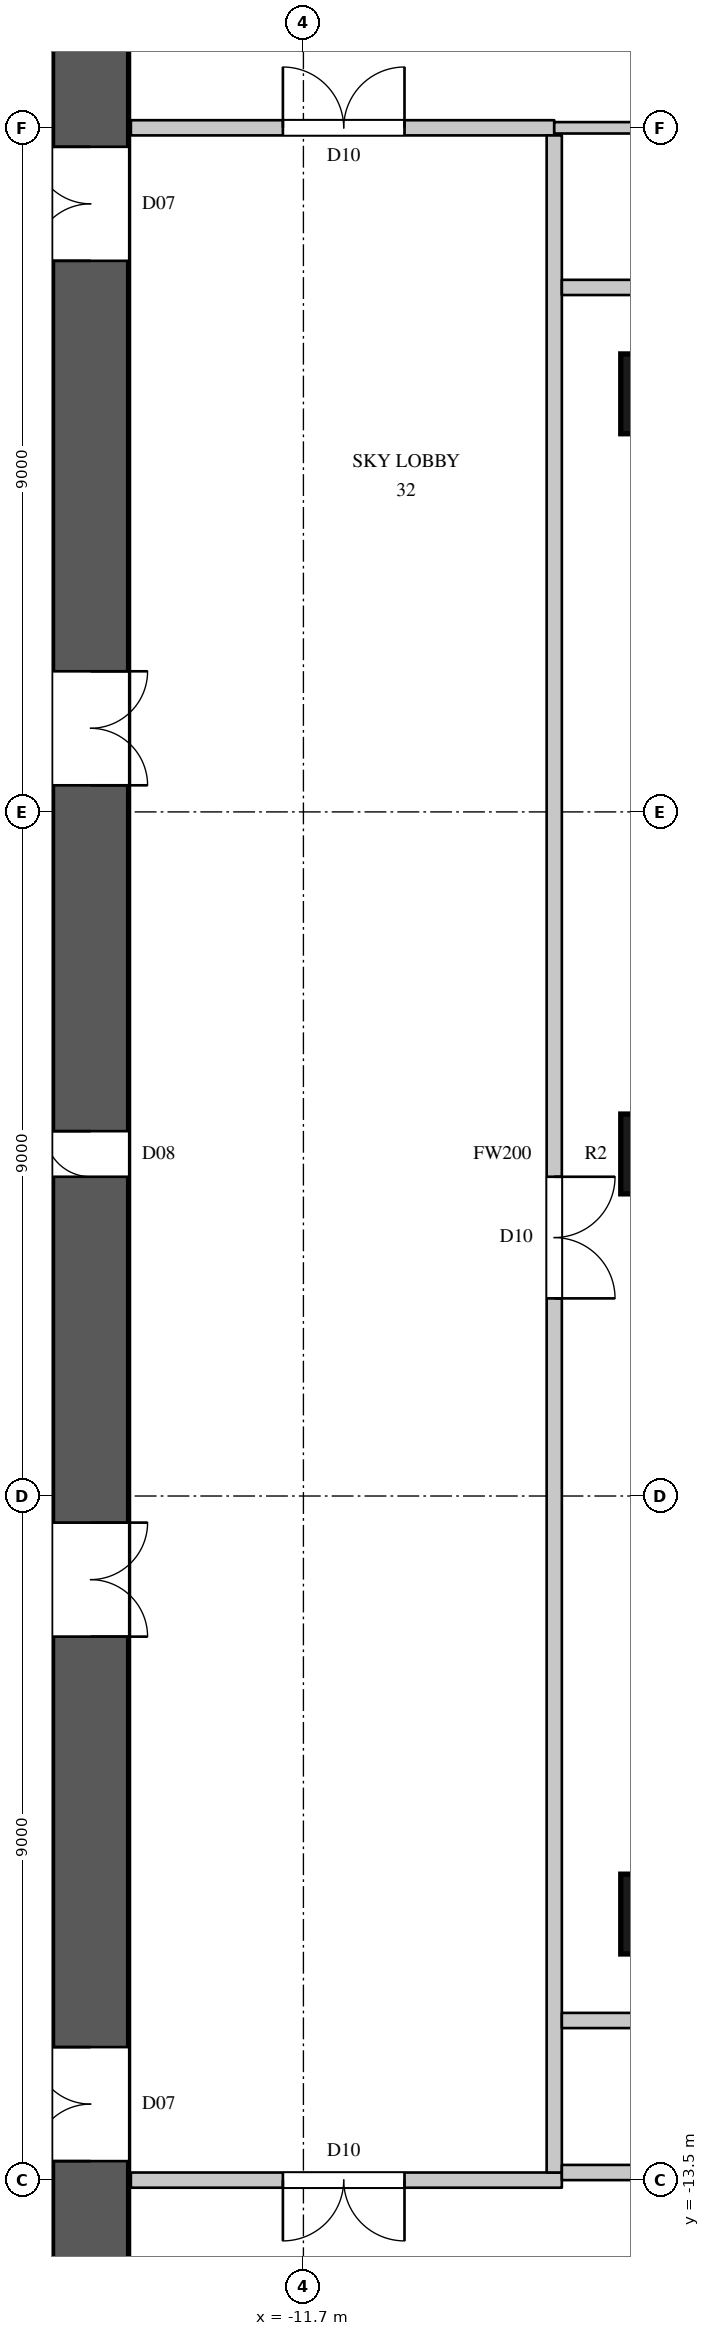
"""IFC4 building model, lengths in metres.
Left out: names, types, materials, properties, quantities, classifications, styles, units other than length and angle.
Written with IfcOpenShell. Run it as: python <this file> out.ifc"""

import sys

from ifc_helpers import new_model, si_unit, direction, frame, frame_2d, origin, origin_2d, place, context, subcontext, project, spatial, rectangle, circle, extrude, element, fill, save


model = new_model("IFC4")
c1 = context("Model", 3, precision=1e-05, world=origin(), true_north=direction((0.0, 1.0)))
c2 = subcontext(c1, "Body", "Model", "MODEL_VIEW")
j1 = project(units=[si_unit("LENGTHUNIT", "METRE"), si_unit("PLANEANGLEUNIT", "RADIAN")], contexts=[c1])
p1 = place(None, origin())
s1 = spatial("IfcSite", under=j1, at=p1, CompositionType="ELEMENT")
p2 = place(p1, origin())
s2 = spatial("IfcBuilding", under=s1, at=p2, CompositionType="ELEMENT")
p3 = place(p2, frame((0.0, 0.0, 145.5)))
s3 = spatial("IfcBuildingStorey", under=s2, at=p3, CompositionType="ELEMENT", Elevation=145.5)
for number, where, z_axis, x_axis in (
    (1, (-7.0, -10.0, 0.0), (0.0, 0.0, 1.0), (1.0, 0.0, 0.0)),
    (2, (-7.0, 0.0, 0.0), (0.0, 0.0, 1.0), (1.0, 0.0, 0.0)),
    (3, (-7.0, 10.0, 0.0), (0.0, 0.0, 1.0), (1.0, 0.0, 0.0)),
):
    element("IfcColumn", number, at=place(p3, frame(where, z_axis=z_axis, x_axis=x_axis)), inside=s3, PredefinedType="COLUMN", context=c2, shape_type="SweptSolid", body=[
        extrude(circle(Radius=0.525, at=origin_2d()), origin(), (0.0, 0.0, 1.0), 7.0),
    ])
p4 = place(p3, frame((-14.5, -14.8, 0.0), z_axis=(0.0, 0.0, 1.0), x_axis=(0.0, 1.0, 0.0)))
e4 = element("IfcWall", 4, at=p4, inside=s3, PredefinedType="SHEAR", context=c2, shape_type="SweptSolid", body=[
    extrude(rectangle(XDim=29.6, YDim=1.0, at=frame_2d((14.8, 0.0))), origin(), (0.0, 0.0, 1.0), 7.0),
])
p5 = place(p4, frame((1.55, 0.0, 0.0)))
e5 = element("IfcOpeningElement", 5, at=p5, cuts=e4, PredefinedType="OPENING", context=c2, shape_type="SweptSolid", body=[
    extrude(rectangle(XDim=1.5, YDim=2.4, at=frame_2d((0.75, 1.2))), frame((0.0, 0.51, 0.0), z_axis=(0.0, -1.0, 0.0), x_axis=(1.0, 0.0, 0.0)), (0.0, 0.0, 1.0), 1.02),
])
p6 = place(p4, frame((26.55, 0.0, 0.0)))
e6 = element("IfcOpeningElement", 6, at=p6, cuts=e4, PredefinedType="OPENING", context=c2, shape_type="SweptSolid", body=[
    extrude(rectangle(XDim=1.5, YDim=2.4, at=frame_2d((0.75, 1.2))), frame((0.0, 0.51, 0.0), z_axis=(0.0, -1.0, 0.0), x_axis=(1.0, 0.0, 0.0)), (0.0, 0.0, 1.0), 1.02),
])
p7 = place(p4, frame((8.45, 0.0, 0.0)))
e7 = element("IfcOpeningElement", 7, at=p7, cuts=e4, PredefinedType="OPENING", context=c2, shape_type="SweptSolid", body=[
    extrude(rectangle(XDim=1.5, YDim=2.4, at=frame_2d((0.75, 1.2))), frame((0.0, 0.51, 0.0), z_axis=(0.0, -1.0, 0.0), x_axis=(1.0, 0.0, 0.0)), (0.0, 0.0, 1.0), 1.02),
])
p8 = place(p4, frame((19.65, 0.0, 0.0)))
e8 = element("IfcOpeningElement", 8, at=p8, cuts=e4, PredefinedType="OPENING", context=c2, shape_type="SweptSolid", body=[
    extrude(rectangle(XDim=1.5, YDim=2.4, at=frame_2d((0.75, 1.2))), frame((0.0, 0.51, 0.0), z_axis=(0.0, -1.0, 0.0), x_axis=(1.0, 0.0, 0.0)), (0.0, 0.0, 1.0), 1.02),
])
p9 = place(p4, frame((14.5, 0.0, 0.0)))
e9 = element("IfcOpeningElement", 9, at=p9, cuts=e4, PredefinedType="OPENING", context=c2, shape_type="SweptSolid", body=[
    extrude(rectangle(XDim=0.6, YDim=2.0, at=frame_2d((0.3, 1.0))), frame((0.0, 0.51, 0.0), z_axis=(0.0, -1.0, 0.0), x_axis=(1.0, 0.0, 0.0)), (0.0, 0.0, 1.0), 1.02),
])
p10 = place(p3, frame((-13.97, -13.5, 0.0), z_axis=(0.0, 0.0, 1.0), x_axis=(1.0, 0.0, 0.0)))
e10 = element("IfcWall", 10, at=p10, inside=s3, PredefinedType="PARTITIONING", context=c2, shape_type="SweptSolid", body=[
    extrude(rectangle(XDim=5.67, YDim=0.2, at=frame_2d((2.835, 0.0))), origin(), (0.0, 0.0, 1.0), 6.7),
])
p11 = place(p10, frame((2.0, 0.0, 0.0)))
e11 = element("IfcOpeningElement", 11, at=p11, cuts=e10, PredefinedType="OPENING", context=c2, shape_type="SweptSolid", body=[
    extrude(rectangle(XDim=1.6, YDim=2.4, at=frame_2d((0.8, 1.2))), frame((0.0, 0.11, 0.0), z_axis=(0.0, -1.0, 0.0), x_axis=(1.0, 0.0, 0.0)), (0.0, 0.0, 1.0), 0.22),
])
p12 = place(p3, frame((-13.97, 13.5, 0.0), z_axis=(0.0, 0.0, 1.0), x_axis=(1.0, 0.0, 0.0)))
e12 = element("IfcWall", 12, at=p12, inside=s3, PredefinedType="PARTITIONING", context=c2, shape_type="SweptSolid", body=[
    extrude(rectangle(XDim=5.57, YDim=0.2, at=frame_2d((2.785, 0.0))), origin(), (0.0, 0.0, 1.0), 6.7),
])
p13 = place(p12, frame((2.0, 0.0, 0.0)))
e13 = element("IfcOpeningElement", 13, at=p13, cuts=e12, PredefinedType="OPENING", context=c2, shape_type="SweptSolid", body=[
    extrude(rectangle(XDim=1.6, YDim=2.4, at=frame_2d((0.8, 1.2))), frame((0.0, 0.11, 0.0), z_axis=(0.0, -1.0, 0.0), x_axis=(1.0, 0.0, 0.0)), (0.0, 0.0, 1.0), 0.22),
])
p14 = place(p3, frame((-8.4, -13.4, 0.0), z_axis=(0.0, 0.0, 1.0), x_axis=(0.0, 1.0, 0.0)))
e14 = element("IfcWall", 14, at=p14, inside=s3, PredefinedType="PARTITIONING", context=c2, shape_type="SweptSolid", body=[
    extrude(rectangle(XDim=26.8, YDim=0.2, at=frame_2d((13.4, 0.0))), origin(), (0.0, 0.0, 1.0), 6.7),
])
p15 = place(p14, frame((11.5, 0.0, 0.0)))
e15 = element("IfcOpeningElement", 15, at=p15, cuts=e14, PredefinedType="OPENING", context=c2, shape_type="SweptSolid", body=[
    extrude(rectangle(XDim=1.6, YDim=2.4, at=frame_2d((0.8, 1.2))), frame((0.0, 0.11, 0.0), z_axis=(0.0, -1.0, 0.0), x_axis=(1.0, 0.0, 0.0)), (0.0, 0.0, 1.0), 0.22),
])
p16 = place(p3, frame((-8.3, -13.4, 0.0), z_axis=(0.0, 0.0, 1.0), x_axis=(1.0, 0.0, 0.0)))
e16 = element("IfcWall", 16, at=p16, inside=s3, PredefinedType="PARTITIONING", context=c2, shape_type="SweptSolid", body=[
    extrude(rectangle(XDim=31.8, YDim=0.2, at=frame_2d((15.9, 0.0))), origin(), (0.0, 0.0, 1.0), 6.7),
])
p17 = place(p16, frame((24.5, 0.0, 0.0)))
e17 = element("IfcOpeningElement", 17, at=p17, cuts=e16, PredefinedType="OPENING", context=c2, shape_type="SweptSolid", body=[
    extrude(rectangle(XDim=0.95, YDim=2.2, at=frame_2d((0.475, 1.1))), frame((0.0, 0.11, 0.0), z_axis=(0.0, -1.0, 0.0), x_axis=(1.0, 0.0, 0.0)), (0.0, 0.0, 1.0), 0.22),
])
p18 = place(p3, frame((-8.3, -11.4, 0.0), z_axis=(0.0, 0.0, 1.0), x_axis=(1.0, 0.0, 0.0)))
e18 = element("IfcWall", 18, at=p18, inside=s3, PredefinedType="PARTITIONING", context=c2, shape_type="SweptSolid", body=[
    extrude(rectangle(XDim=32.655, YDim=0.2, at=frame_2d((16.328, 0.0))), origin(), (0.0, 0.0, 1.0), 6.7),
])
p19 = place(p18, frame((9.6, 0.0, 0.0)))
e19 = element("IfcOpeningElement", 19, at=p19, cuts=e18, PredefinedType="OPENING", context=c2, shape_type="SweptSolid", body=[
    extrude(rectangle(XDim=1.5, YDim=2.2, at=frame_2d((0.75, 1.1))), frame((0.0, 0.11, 0.0), z_axis=(0.0, -1.0, 0.0), x_axis=(1.0, 0.0, 0.0)), (0.0, 0.0, 1.0), 0.22),
])
p20 = place(p18, frame((28.45, 0.0, 0.0)))
e20 = element("IfcOpeningElement", 20, at=p20, cuts=e18, PredefinedType="OPENING", context=c2, shape_type="SweptSolid", body=[
    extrude(rectangle(XDim=0.95, YDim=2.2, at=frame_2d((0.475, 1.1))), frame((0.0, 0.11, 0.0), z_axis=(0.0, -1.0, 0.0), x_axis=(1.0, 0.0, 0.0)), (0.0, 0.0, 1.0), 0.22),
])
p21 = place(p3, frame((-8.3, 11.4, 0.0), z_axis=(0.0, 0.0, 1.0), x_axis=(1.0, 0.0, 0.0)))
e21 = element("IfcWall", 21, at=p21, inside=s3, PredefinedType="PARTITIONING", context=c2, shape_type="SweptSolid", body=[
    extrude(rectangle(XDim=18.8, YDim=0.2, at=frame_2d((9.4, 0.0))), origin(), (0.0, 0.0, 1.0), 6.7),
])
p22 = place(p21, frame((7.4, 0.0, 0.0)))
e22 = element("IfcOpeningElement", 22, at=p22, cuts=e21, PredefinedType="OPENING", context=c2, shape_type="SweptSolid", body=[
    extrude(rectangle(XDim=1.6, YDim=2.4, at=frame_2d((0.8, 1.2))), frame((0.0, 0.11, 0.0), z_axis=(0.0, -1.0, 0.0), x_axis=(1.0, 0.0, 0.0)), (0.0, 0.0, 1.0), 0.22),
])
p23 = place(p3, frame((-8.4, 13.5, 0.0), z_axis=(0.0, 0.0, 1.0), x_axis=(1.0, 0.0, 0.0)))
e23 = element("IfcWall", 23, at=p23, inside=s3, PredefinedType="PARTITIONING", context=c2, shape_type="SweptSolid", body=[
    extrude(rectangle(XDim=2.475, YDim=0.15, at=frame_2d((1.237, 0.0))), origin(), (0.0, 0.0, 1.0), 6.7),
])
p24 = place(p15, origin())
e24 = element("IfcDoor", 24, at=p24, inside=s3, OperationType="DOUBLE_DOOR_SINGLE_SWING", PredefinedType="DOOR", context=c2, shape_type="SweptSolid", body=[
    extrude(rectangle(XDim=1.6, YDim=2.4, at=frame_2d((0.8, 1.2))), frame((0.0, 0.025, 0.0), z_axis=(0.0, -1.0, 0.0), x_axis=(1.0, 0.0, 0.0)), (0.0, 0.0, 1.0), 0.05),
])
fill(e15, e24)
p25 = place(p11, origin())
e25 = element("IfcDoor", 25, at=p25, inside=s3, OperationType="DOUBLE_DOOR_SINGLE_SWING", PredefinedType="DOOR", context=c2, shape_type="SweptSolid", body=[
    extrude(rectangle(XDim=1.6, YDim=2.4, at=frame_2d((0.8, 1.2))), frame((0.0, 0.025, 0.0), z_axis=(0.0, -1.0, 0.0), x_axis=(1.0, 0.0, 0.0)), (0.0, 0.0, 1.0), 0.05),
])
fill(e11, e25)
p26 = place(p13, origin())
e26 = element("IfcDoor", 26, at=p26, inside=s3, OperationType="DOUBLE_DOOR_SINGLE_SWING", PredefinedType="DOOR", context=c2, shape_type="SweptSolid", body=[
    extrude(rectangle(XDim=1.6, YDim=2.4, at=frame_2d((0.8, 1.2))), frame((0.0, 0.025, 0.0), z_axis=(0.0, -1.0, 0.0), x_axis=(1.0, 0.0, 0.0)), (0.0, 0.0, 1.0), 0.05),
])
fill(e13, e26)
p27 = place(p5, origin())
e27 = element("IfcDoor", 27, at=p27, inside=s3, OperationType="DOUBLE_DOOR_SINGLE_SWING", PredefinedType="DOOR", context=c2, shape_type="SweptSolid", body=[
    extrude(rectangle(XDim=1.5, YDim=2.4, at=frame_2d((0.75, 1.2))), frame((0.0, 0.495, 0.0), z_axis=(0.0, -1.0, 0.0), x_axis=(1.0, 0.0, 0.0)), (0.0, 0.0, 1.0), 0.05),
])
fill(e5, e27)
p28 = place(p6, origin())
e28 = element("IfcDoor", 28, at=p28, inside=s3, OperationType="DOUBLE_DOOR_SINGLE_SWING", PredefinedType="DOOR", context=c2, shape_type="SweptSolid", body=[
    extrude(rectangle(XDim=1.5, YDim=2.4, at=frame_2d((0.75, 1.2))), frame((0.0, 0.495, 0.0), z_axis=(0.0, -1.0, 0.0), x_axis=(1.0, 0.0, 0.0)), (0.0, 0.0, 1.0), 0.05),
])
fill(e6, e28)
p29 = place(p7, origin())
e29 = element("IfcDoor", 29, at=p29, inside=s3, OperationType="DOUBLE_DOOR_SINGLE_SWING", PredefinedType="DOOR", context=c2, shape_type="SweptSolid", body=[
    extrude(rectangle(XDim=1.5, YDim=2.4, at=frame_2d((0.75, 1.2))), frame((0.0, -0.445, 0.0), z_axis=(0.0, -1.0, 0.0), x_axis=(1.0, 0.0, 0.0)), (0.0, 0.0, 1.0), 0.05),
])
fill(e7, e29)
p30 = place(p8, origin())
e30 = element("IfcDoor", 30, at=p30, inside=s3, OperationType="DOUBLE_DOOR_SINGLE_SWING", PredefinedType="DOOR", context=c2, shape_type="SweptSolid", body=[
    extrude(rectangle(XDim=1.5, YDim=2.4, at=frame_2d((0.75, 1.2))), frame((0.0, -0.445, 0.0), z_axis=(0.0, -1.0, 0.0), x_axis=(1.0, 0.0, 0.0)), (0.0, 0.0, 1.0), 0.05),
])
fill(e8, e30)
p31 = place(p9, origin())
e31 = element("IfcDoor", 31, at=p31, inside=s3, OperationType="SINGLE_SWING_RIGHT", PredefinedType="DOOR", context=c2, shape_type="SweptSolid", body=[
    extrude(rectangle(XDim=0.6, YDim=2.0, at=frame_2d((0.3, 1.0))), frame((0.0, 0.495, 0.0), z_axis=(0.0, -1.0, 0.0), x_axis=(1.0, 0.0, 0.0)), (0.0, 0.0, 1.0), 0.05),
])
fill(e9, e31)
save(model, sys.argv[1])
